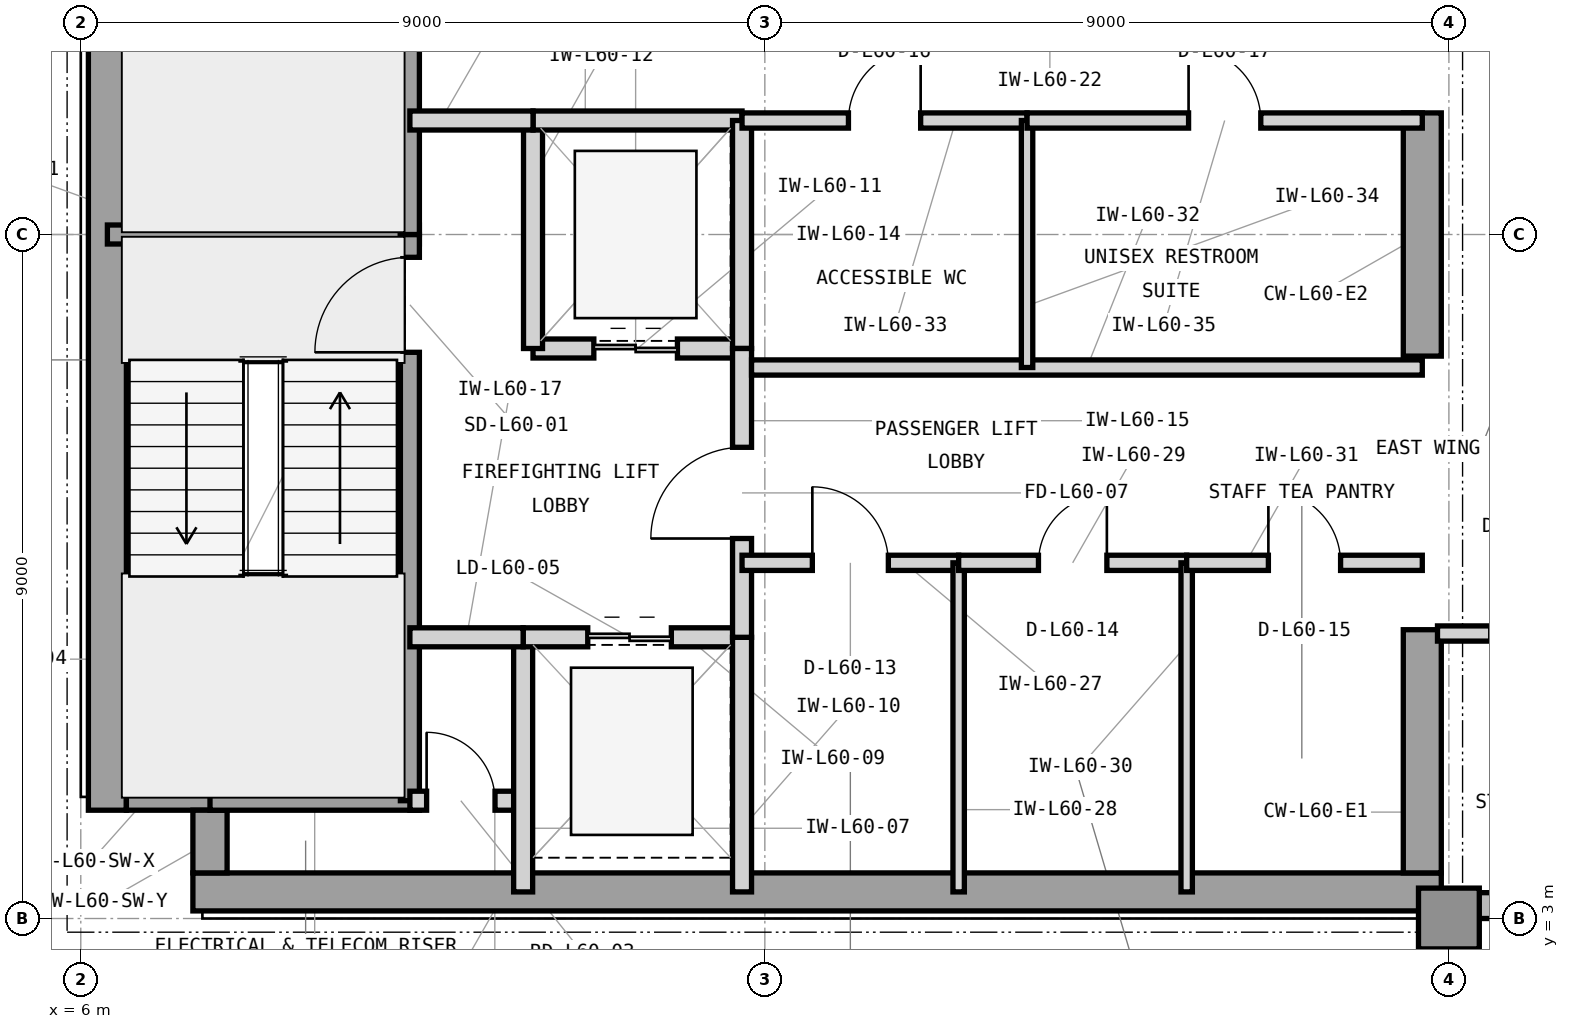
"""IFC4 building model, lengths in metres.
Left out: names, types, materials, properties, quantities, classifications, styles, units other than length and angle.
Written with IfcOpenShell. Run it as: python <this file> out.ifc"""

import sys

from ifc_helpers import new_model, si_unit, direction, frame, frame_2d, origin, origin_2d, place, context, subcontext, project, spatial, rectangle, extrude, element, fill, save


model = new_model("IFC4")
c1 = context("Model", 3, precision=1e-05, world=origin(), true_north=direction((0.0, 1.0)))
c2 = subcontext(c1, "Body", "Model", "MODEL_VIEW")
j1 = project(units=[si_unit("LENGTHUNIT", "METRE"), si_unit("PLANEANGLEUNIT", "RADIAN")], contexts=[c1])
p1 = place(None, origin())
s1 = spatial("IfcSite", under=j1, at=p1, CompositionType="ELEMENT")
p2 = place(p1, origin())
s2 = spatial("IfcBuilding", under=s1, at=p2, CompositionType="ELEMENT")
p3 = place(p2, frame((0.0, 0.0, 246.9)))
s3 = spatial("IfcBuildingStorey", under=s2, at=p3, CompositionType="ELEMENT", Elevation=246.9)
p4 = place(p3, frame((7.475, 3.35, 0.0), z_axis=(0.0, 0.0, 1.0), x_axis=(1.0, 0.0, 0.0)))
e1 = element("IfcWall", 1, at=p4, inside=s3, PredefinedType="SHEAR", context=c2, shape_type="SweptSolid", body=[
    extrude(rectangle(XDim=16.425, YDim=0.5, at=frame_2d((8.212, 0.0))), origin(), (0.0, 0.0, 1.0), 3.9),
])
p5 = place(p3, frame((6.35, 4.425, 0.0), z_axis=(0.0, 0.0, 1.0), x_axis=(0.0, 1.0, 0.0)))
e2 = element("IfcWall", 2, at=p5, inside=s3, PredefinedType="SHEAR", context=c2, shape_type="SweptSolid", body=[
    extrude(rectangle(XDim=15.15, YDim=0.5, at=frame_2d((7.575, 0.0))), origin(), (0.0, 0.0, 1.0), 3.9),
])
p6 = place(p3, frame((23.65, 3.6, 0.0), z_axis=(0.0, 0.0, 1.0), x_axis=(0.0, 1.0, 0.0)))
e3 = element("IfcWall", 3, at=p6, inside=s3, PredefinedType="SHEAR", context=c2, shape_type="SweptSolid", body=[
    extrude(rectangle(XDim=3.2, YDim=0.5, at=frame_2d((1.6, 0.0))), origin(), (0.0, 0.0, 1.0), 3.9),
])
p7 = place(p3, frame((23.65, 10.4, 0.0), z_axis=(0.0, 0.0, 1.0), x_axis=(0.0, 1.0, 0.0)))
e4 = element("IfcWall", 4, at=p7, inside=s3, PredefinedType="SHEAR", context=c2, shape_type="SweptSolid", body=[
    extrude(rectangle(XDim=3.2, YDim=0.5, at=frame_2d((1.6, 0.0))), origin(), (0.0, 0.0, 1.0), 3.9),
])
p8 = place(p3, frame((6.6, 4.65, 0.0), z_axis=(0.0, 0.0, 1.0), x_axis=(1.0, 0.0, 0.0)))
e5 = element("IfcWall", 5, at=p8, inside=s3, PredefinedType="SHEAR", context=c2, shape_type="SweptSolid", body=[
    extrude(rectangle(XDim=1.325, YDim=0.45, at=frame_2d((0.663, 0.0))), origin(), (0.0, 0.0, 1.0), 3.9),
])
p9 = place(p3, frame((7.7, 3.6, 0.0), z_axis=(0.0, 0.0, 1.0), x_axis=(0.0, 1.0, 0.0)))
e6 = element("IfcWall", 6, at=p9, inside=s3, PredefinedType="SHEAR", context=c2, shape_type="SweptSolid", body=[
    extrude(rectangle(XDim=0.825, YDim=0.45, at=frame_2d((0.413, 0.0))), origin(), (0.0, 0.0, 1.0), 3.9),
])
p10 = place(p3, frame((24.0, 3.0, 0.0), z_axis=(0.0, 0.0, 1.0), x_axis=(1.0, 0.0, 0.0)))
e7 = element("IfcColumn", 7, at=p10, inside=s3, PredefinedType="COLUMN", context=c2, shape_type="SweptSolid", body=[
    extrude(rectangle(XDim=0.8, YDim=0.8, at=origin_2d()), origin(), (0.0, 0.0, 1.0), 3.9),
])
p11 = place(p3, frame((23.9, 3.17, 0.0), z_axis=(0.0, 0.0, 1.0), x_axis=(1.0, 0.0, 0.0)))
e8 = element("IfcWall", 8, at=p11, inside=s3, PredefinedType="STANDARD", context=c2, shape_type="SweptSolid", body=[
    extrude(rectangle(XDim=28.5, YDim=0.34, at=frame_2d((14.25, 0.0))), origin(), (0.0, 0.0, 1.0), 3.7),
])
p12 = place(p11, frame((10.725, 0.0, 0.9)))
e9 = element("IfcOpeningElement", 9, at=p12, cuts=e8, PredefinedType="OPENING", context=c2, shape_type="SweptSolid", body=[
    extrude(rectangle(XDim=2.3, YDim=2.2, at=frame_2d((1.15, 1.1))), frame((0.0, 0.18, 0.0), z_axis=(0.0, -1.0, 0.0), x_axis=(1.0, 0.0, 0.0)), (0.0, 0.0, 1.0), 0.36),
])
p13 = place(p11, frame((0.85, 0.0, 0.9)))
e10 = element("IfcOpeningElement", 10, at=p13, cuts=e8, PredefinedType="OPENING", context=c2, shape_type="SweptSolid", body=[
    extrude(rectangle(XDim=1.6, YDim=2.2, at=frame_2d((0.8, 1.1))), frame((0.0, 0.18, 0.0), z_axis=(0.0, -1.0, 0.0), x_axis=(1.0, 0.0, 0.0)), (0.0, 0.0, 1.0), 0.36),
])
p14 = place(p11, frame((19.075, 0.0, 0.9)))
e11 = element("IfcOpeningElement", 11, at=p14, cuts=e8, PredefinedType="OPENING", context=c2, shape_type="SweptSolid", body=[
    extrude(rectangle(XDim=2.3, YDim=2.2, at=frame_2d((1.15, 1.1))), frame((0.0, 0.18, 0.0), z_axis=(0.0, -1.0, 0.0), x_axis=(1.0, 0.0, 0.0)), (0.0, 0.0, 1.0), 0.36),
])
p15 = place(p3, frame((6.35, 12.0, 0.0), z_axis=(0.0, 0.0, 1.0), x_axis=(1.0, 0.0, 0.0)))
e12 = element("IfcWall", 12, at=p15, inside=s3, PredefinedType="SHEAR", context=c2, shape_type="SweptSolid", body=[
    extrude(rectangle(XDim=4.105, YDim=0.25, at=frame_2d((2.052, 0.0))), origin(), (0.0, 0.0, 1.0), 3.9),
])
p16 = place(p3, frame((7.7, 4.55, 0.0), z_axis=(0.0, 0.0, 1.0), x_axis=(1.0, 0.0, 0.0)))
e13 = element("IfcWall", 13, at=p16, inside=s3, PredefinedType="SHEAR", context=c2, shape_type="SweptSolid", body=[
    extrude(rectangle(XDim=2.755, YDim=0.25, at=frame_2d((1.377, 0.0))), origin(), (0.0, 0.0, 1.0), 3.9),
])
p17 = place(p3, frame((10.33, 4.55, 0.0), z_axis=(0.0, 0.0, 1.0), x_axis=(0.0, 1.0, 0.0)))
e14 = element("IfcWall", 14, at=p17, inside=s3, PredefinedType="SHEAR", context=c2, shape_type="SweptSolid", body=[
    extrude(rectangle(XDim=7.45, YDim=0.25, at=frame_2d((3.725, 0.0))), origin(), (0.0, 0.0, 1.0), 3.9),
])
p18 = place(p17, frame((5.9, 0.0, 0.0)))
e15 = element("IfcOpeningElement", 15, at=p18, cuts=e14, PredefinedType="OPENING", context=c2, shape_type="SweptSolid", body=[
    extrude(rectangle(XDim=1.25, YDim=2.2, at=frame_2d((0.625, 1.1))), frame((0.0, 0.135, 0.0), z_axis=(0.0, -1.0, 0.0), x_axis=(1.0, 0.0, 0.0)), (0.0, 0.0, 1.0), 0.27),
])
p19 = place(p3, frame((10.33, 12.0, 0.0), z_axis=(0.0, 0.0, 1.0), x_axis=(0.0, 1.0, 0.0)))
e16 = element("IfcWall", 16, at=p19, inside=s3, PredefinedType="SHEAR", context=c2, shape_type="SweptSolid", body=[
    extrude(rectangle(XDim=7.45, YDim=0.25, at=frame_2d((3.725, 0.0))), origin(), (0.0, 0.0, 1.0), 3.9),
])
p20 = place(p19, frame((5.85, 0.0, 0.0)))
e17 = element("IfcOpeningElement", 17, at=p20, cuts=e16, PredefinedType="OPENING", context=c2, shape_type="SweptSolid", body=[
    extrude(rectangle(XDim=1.25, YDim=2.2, at=frame_2d((0.625, 1.1))), frame((0.0, 0.135, 0.0), z_axis=(0.0, -1.0, 0.0), x_axis=(1.0, 0.0, 0.0)), (0.0, 0.0, 1.0), 0.27),
])
p21 = place(p3, frame((10.33, 4.55, 0.0), z_axis=(0.0, 0.0, 1.0), x_axis=(1.0, 0.0, 0.0)))
e18 = element("IfcWall", 18, at=p21, inside=s3, PredefinedType="PARTITIONING", context=c2, shape_type="SweptSolid", body=[
    extrude(rectangle(XDim=1.49, YDim=0.25, at=frame_2d((0.745, 0.0))), origin(), (0.0, 0.0, 1.0), 3.69),
])
p22 = place(p21, frame((0.22, 0.0, 0.0)))
e19 = element("IfcOpeningElement", 19, at=p22, cuts=e18, PredefinedType="OPENING", context=c2, shape_type="SweptSolid", body=[
    extrude(rectangle(XDim=0.9, YDim=2.1, at=frame_2d((0.45, 1.05))), frame((0.0, 0.135, 0.0), z_axis=(0.0, -1.0, 0.0), x_axis=(1.0, 0.0, 0.0)), (0.0, 0.0, 1.0), 0.27),
])
p23 = place(p3, frame((11.82, 3.35, 0.0), z_axis=(0.0, 0.0, 1.0), x_axis=(0.0, 1.0, 0.0)))
e20 = element("IfcWall", 20, at=p23, inside=s3, PredefinedType="PARTITIONING", context=c2, shape_type="SweptSolid", body=[
    extrude(rectangle(XDim=3.35, YDim=0.25, at=frame_2d((1.675, 0.0))), origin(), (0.0, 0.0, 1.0), 3.69),
])
p24 = place(p3, frame((11.82, 6.7, 0.0), z_axis=(0.0, 0.0, 1.0), x_axis=(1.0, 0.0, 0.0)))
e21 = element("IfcWall", 21, at=p24, inside=s3, PredefinedType="PARTITIONING", context=c2, shape_type="SweptSolid", body=[
    extrude(rectangle(XDim=2.88, YDim=0.25, at=frame_2d((1.44, 0.0))), origin(), (0.0, 0.0, 1.0), 3.073),
])
p25 = place(p24, frame((0.85, 0.0, 0.0)))
e22 = element("IfcOpeningElement", 22, at=p25, cuts=e21, PredefinedType="OPENING", context=c2, shape_type="SweptSolid", body=[
    extrude(rectangle(XDim=1.1, YDim=2.25, at=frame_2d((0.55, 1.125))), frame((0.0, 0.135, 0.0), z_axis=(0.0, -1.0, 0.0), x_axis=(1.0, 0.0, 0.0)), (0.0, 0.0, 1.0), 0.27),
])
p26 = place(p3, frame((14.7, 3.35, 0.0), z_axis=(0.0, 0.0, 1.0), x_axis=(0.0, 1.0, 0.0)))
e23 = element("IfcWall", 23, at=p26, inside=s3, PredefinedType="PARTITIONING", context=c2, shape_type="SweptSolid", body=[
    extrude(rectangle(XDim=3.35, YDim=0.25, at=frame_2d((1.675, 0.0))), origin(), (0.0, 0.0, 1.0), 3.69),
])
p27 = place(p3, frame((11.95, 10.5, 0.0), z_axis=(0.0, 0.0, 1.0), x_axis=(1.0, 0.0, 0.0)))
e24 = element("IfcWall", 24, at=p27, inside=s3, PredefinedType="PARTITIONING", context=c2, shape_type="SweptSolid", body=[
    extrude(rectangle(XDim=2.75, YDim=0.25, at=frame_2d((1.375, 0.0))), origin(), (0.0, 0.0, 1.0), 3.073),
])
p28 = place(p27, frame((0.8, 0.0, 0.0)))
e25 = element("IfcOpeningElement", 25, at=p28, cuts=e24, PredefinedType="OPENING", context=c2, shape_type="SweptSolid", body=[
    extrude(rectangle(XDim=1.1, YDim=2.25, at=frame_2d((0.55, 1.125))), frame((0.0, 0.135, 0.0), z_axis=(0.0, -1.0, 0.0), x_axis=(1.0, 0.0, 0.0)), (0.0, 0.0, 1.0), 0.27),
])
p29 = place(p3, frame((11.95, 10.5, 0.0), z_axis=(0.0, 0.0, 1.0), x_axis=(0.0, 1.0, 0.0)))
e26 = element("IfcWall", 26, at=p29, inside=s3, PredefinedType="PARTITIONING", context=c2, shape_type="SweptSolid", body=[
    extrude(rectangle(XDim=3.0, YDim=0.25, at=frame_2d((1.5, 0.0))), origin(), (0.0, 0.0, 1.0), 3.69),
])
p30 = place(p3, frame((11.95, 13.5, 0.0), z_axis=(0.0, 0.0, 1.0), x_axis=(1.0, 0.0, 0.0)))
e27 = element("IfcWall", 27, at=p30, inside=s3, PredefinedType="PARTITIONING", context=c2, shape_type="SweptSolid", body=[
    extrude(rectangle(XDim=2.75, YDim=0.25, at=frame_2d((1.375, 0.0))), origin(), (0.0, 0.0, 1.0), 3.073),
])
p31 = place(p3, frame((14.7, 10.5, 0.0), z_axis=(0.0, 0.0, 1.0), x_axis=(0.0, 1.0, 0.0)))
e28 = element("IfcWall", 28, at=p31, inside=s3, PredefinedType="PARTITIONING", context=c2, shape_type="SweptSolid", body=[
    extrude(rectangle(XDim=3.0, YDim=0.25, at=frame_2d((1.5, 0.0))), origin(), (0.0, 0.0, 1.0), 3.69),
])
p32 = place(p3, frame((14.7, 6.7, 0.0), z_axis=(0.0, 0.0, 1.0), x_axis=(0.0, 1.0, 0.0)))
e29 = element("IfcWall", 29, at=p32, inside=s3, PredefinedType="PARTITIONING", context=c2, shape_type="SweptSolid", body=[
    extrude(rectangle(XDim=3.8, YDim=0.25, at=frame_2d((1.9, 0.0))), origin(), (0.0, 0.0, 1.0), 3.69),
])
p33 = place(p32, frame((1.3, 0.0, 0.0)))
e30 = element("IfcOpeningElement", 30, at=p33, cuts=e29, PredefinedType="OPENING", context=c2, shape_type="SweptSolid", body=[
    extrude(rectangle(XDim=1.2, YDim=2.2, at=frame_2d((0.6, 1.1))), frame((0.0, 0.135, 0.0), z_axis=(0.0, -1.0, 0.0), x_axis=(1.0, 0.0, 0.0)), (0.0, 0.0, 1.0), 0.27),
])
p34 = place(p3, frame((10.33, 13.5, 0.0), z_axis=(0.0, 0.0, 1.0), x_axis=(1.0, 0.0, 0.0)))
e31 = element("IfcWall", 31, at=p34, inside=s3, PredefinedType="PARTITIONING", context=c2, shape_type="SweptSolid", body=[
    extrude(rectangle(XDim=1.62, YDim=0.25, at=frame_2d((0.81, 0.0))), origin(), (0.0, 0.0, 1.0), 3.073),
])
p35 = place(p3, frame((10.33, 6.7, 0.0), z_axis=(0.0, 0.0, 1.0), x_axis=(1.0, 0.0, 0.0)))
e32 = element("IfcWall", 32, at=p35, inside=s3, PredefinedType="PARTITIONING", context=c2, shape_type="SweptSolid", body=[
    extrude(rectangle(XDim=1.49, YDim=0.25, at=frame_2d((0.745, 0.0))), origin(), (0.0, 0.0, 1.0), 3.073),
])
p36 = place(p3, frame((14.7, 7.68, 0.0), z_axis=(0.0, 0.0, 1.0), x_axis=(1.0, 0.0, 0.0)))
e33 = element("IfcWall", 33, at=p36, inside=s3, PredefinedType="PARTITIONING", context=c2, shape_type="SweptSolid", body=[
    extrude(rectangle(XDim=2.85, YDim=0.2, at=frame_2d((1.425, 0.0))), origin(), (0.0, 0.0, 1.0), 3.69),
])
p37 = place(p36, frame((0.925, 0.0, 0.0)))
e34 = element("IfcOpeningElement", 34, at=p37, cuts=e33, PredefinedType="OPENING", context=c2, shape_type="SweptSolid", body=[
    extrude(rectangle(XDim=1.0, YDim=2.15, at=frame_2d((0.5, 1.075))), frame((0.0, 0.11, 0.0), z_axis=(0.0, -1.0, 0.0), x_axis=(1.0, 0.0, 0.0)), (0.0, 0.0, 1.0), 0.22),
])
p38 = place(p3, frame((17.55, 3.35, 0.0), z_axis=(0.0, 0.0, 1.0), x_axis=(0.0, 1.0, 0.0)))
e35 = element("IfcWall", 35, at=p38, inside=s3, PredefinedType="PARTITIONING", context=c2, shape_type="SweptSolid", body=[
    extrude(rectangle(XDim=4.33, YDim=0.15, at=frame_2d((2.165, 0.0))), origin(), (0.0, 0.0, 1.0), 3.69),
])
p39 = place(p3, frame((17.55, 7.68, 0.0), z_axis=(0.0, 0.0, 1.0), x_axis=(1.0, 0.0, 0.0)))
e36 = element("IfcWall", 36, at=p39, inside=s3, PredefinedType="PARTITIONING", context=c2, shape_type="SweptSolid", body=[
    extrude(rectangle(XDim=3.0, YDim=0.2, at=frame_2d((1.5, 0.0))), origin(), (0.0, 0.0, 1.0), 3.69),
])
p40 = place(p39, frame((1.05, 0.0, 0.0)))
e37 = element("IfcOpeningElement", 37, at=p40, cuts=e36, PredefinedType="OPENING", context=c2, shape_type="SweptSolid", body=[
    extrude(rectangle(XDim=0.9, YDim=2.1, at=frame_2d((0.45, 1.05))), frame((0.0, 0.11, 0.0), z_axis=(0.0, -1.0, 0.0), x_axis=(1.0, 0.0, 0.0)), (0.0, 0.0, 1.0), 0.22),
])
p41 = place(p3, frame((20.55, 3.35, 0.0), z_axis=(0.0, 0.0, 1.0), x_axis=(0.0, 1.0, 0.0)))
e38 = element("IfcWall", 38, at=p41, inside=s3, PredefinedType="PARTITIONING", context=c2, shape_type="SweptSolid", body=[
    extrude(rectangle(XDim=4.33, YDim=0.15, at=frame_2d((2.165, 0.0))), origin(), (0.0, 0.0, 1.0), 3.69),
])
p42 = place(p3, frame((20.55, 7.68, 0.0), z_axis=(0.0, 0.0, 1.0), x_axis=(1.0, 0.0, 0.0)))
e39 = element("IfcWall", 39, at=p42, inside=s3, PredefinedType="PARTITIONING", context=c2, shape_type="SweptSolid", body=[
    extrude(rectangle(XDim=3.1, YDim=0.2, at=frame_2d((1.55, 0.0))), origin(), (0.0, 0.0, 1.0), 3.69),
])
p43 = place(p42, frame((1.075, 0.0, 0.0)))
e40 = element("IfcOpeningElement", 40, at=p43, cuts=e39, PredefinedType="OPENING", context=c2, shape_type="SweptSolid", body=[
    extrude(rectangle(XDim=0.95, YDim=2.1, at=frame_2d((0.475, 1.05))), frame((0.0, 0.11, 0.0), z_axis=(0.0, -1.0, 0.0), x_axis=(1.0, 0.0, 0.0)), (0.0, 0.0, 1.0), 0.22),
])
p44 = place(p3, frame((14.825, 10.25, 0.0), z_axis=(0.0, 0.0, 1.0), x_axis=(1.0, 0.0, 0.0)))
e41 = element("IfcWall", 41, at=p44, inside=s3, PredefinedType="PARTITIONING", context=c2, shape_type="SweptSolid", body=[
    extrude(rectangle(XDim=8.825, YDim=0.2, at=frame_2d((4.413, 0.0))), origin(), (0.0, 0.0, 1.0), 3.69),
])
p45 = place(p3, frame((14.7, 13.5, 0.0), z_axis=(0.0, 0.0, 1.0), x_axis=(1.0, 0.0, 0.0)))
e42 = element("IfcWall", 42, at=p45, inside=s3, PredefinedType="PARTITIONING", context=c2, shape_type="SweptSolid", body=[
    extrude(rectangle(XDim=3.75, YDim=0.2, at=frame_2d((1.875, 0.0))), origin(), (0.0, 0.0, 1.0), 3.073),
])
p46 = place(p45, frame((1.4, 0.0, 0.0)))
e43 = element("IfcOpeningElement", 43, at=p46, cuts=e42, PredefinedType="OPENING", context=c2, shape_type="SweptSolid", body=[
    extrude(rectangle(XDim=0.95, YDim=2.1, at=frame_2d((0.475, 1.05))), frame((0.0, 0.11, 0.0), z_axis=(0.0, -1.0, 0.0), x_axis=(1.0, 0.0, 0.0)), (0.0, 0.0, 1.0), 0.22),
])
p47 = place(p3, frame((18.45, 10.25, 0.0), z_axis=(0.0, 0.0, 1.0), x_axis=(0.0, 1.0, 0.0)))
e44 = element("IfcWall", 44, at=p47, inside=s3, PredefinedType="PARTITIONING", context=c2, shape_type="SweptSolid", body=[
    extrude(rectangle(XDim=3.25, YDim=0.15, at=frame_2d((1.625, 0.0))), origin(), (0.0, 0.0, 1.0), 3.69),
])
p48 = place(p3, frame((18.45, 13.5, 0.0), z_axis=(0.0, 0.0, 1.0), x_axis=(1.0, 0.0, 0.0)))
e45 = element("IfcWall", 45, at=p48, inside=s3, PredefinedType="PARTITIONING", context=c2, shape_type="SweptSolid", body=[
    extrude(rectangle(XDim=5.2, YDim=0.2, at=frame_2d((2.6, 0.0))), origin(), (0.0, 0.0, 1.0), 3.073),
])
p49 = place(p48, frame((2.125, 0.0, 0.0)))
e46 = element("IfcOpeningElement", 46, at=p49, cuts=e45, PredefinedType="OPENING", context=c2, shape_type="SweptSolid", body=[
    extrude(rectangle(XDim=0.95, YDim=2.1, at=frame_2d((0.475, 1.05))), frame((0.0, 0.11, 0.0), z_axis=(0.0, -1.0, 0.0), x_axis=(1.0, 0.0, 0.0)), (0.0, 0.0, 1.0), 0.22),
])
p50 = place(p3, frame((23.85, 6.75, 0.0), z_axis=(0.0, 0.0, 1.0), x_axis=(1.0, 0.0, 0.0)))
e47 = element("IfcWall", 47, at=p50, inside=s3, PredefinedType="PARTITIONING", context=c2, shape_type="SweptSolid", body=[
    extrude(rectangle(XDim=2.85, YDim=0.2, at=frame_2d((1.425, 0.0))), origin(), (0.0, 0.0, 1.0), 3.69),
])
p51 = place(p50, frame((0.7, 0.0, 0.0)))
e48 = element("IfcOpeningElement", 48, at=p51, cuts=e47, PredefinedType="OPENING", context=c2, shape_type="SweptSolid", body=[
    extrude(rectangle(XDim=1.0, YDim=2.15, at=frame_2d((0.5, 1.075))), frame((0.0, 0.11, 0.0), z_axis=(0.0, -1.0, 0.0), x_axis=(1.0, 0.0, 0.0)), (0.0, 0.0, 1.0), 0.22),
])
p52 = place(p18, origin())
e49 = element("IfcDoor", 49, at=p52, inside=s3, OperationType="SINGLE_SWING_LEFT", PredefinedType="DOOR", context=c2, shape_type="SweptSolid", body=[
    extrude(rectangle(XDim=1.25, YDim=2.2, at=frame_2d((0.625, 1.1))), frame((0.0, 0.025, 0.0), z_axis=(0.0, -1.0, 0.0), x_axis=(1.0, 0.0, 0.0)), (0.0, 0.0, 1.0), 0.05),
])
fill(e15, e49)
p53 = place(p22, origin())
e50 = element("IfcDoor", 50, at=p53, inside=s3, OperationType="SINGLE_SWING_LEFT", PredefinedType="TRAPDOOR", context=c2, shape_type="SweptSolid", body=[
    extrude(rectangle(XDim=0.9, YDim=2.1, at=frame_2d((0.45, 1.05))), frame((0.0, 0.025, 0.0), z_axis=(0.0, -1.0, 0.0), x_axis=(1.0, 0.0, 0.0)), (0.0, 0.0, 1.0), 0.05),
])
fill(e19, e50)
p54 = place(p25, origin())
e51 = element("IfcDoor", 51, at=p54, inside=s3, OperationType="DOUBLE_DOOR_SLIDING", PredefinedType="DOOR", context=c2, shape_type="SweptSolid", body=[
    extrude(rectangle(XDim=1.1, YDim=2.25, at=frame_2d((0.55, 1.125))), frame((0.0, 0.025, 0.0), z_axis=(0.0, -1.0, 0.0), x_axis=(1.0, 0.0, 0.0)), (0.0, 0.0, 1.0), 0.05),
])
fill(e22, e51)
p55 = place(p28, origin())
e52 = element("IfcDoor", 52, at=p55, inside=s3, OperationType="DOUBLE_DOOR_SLIDING", PredefinedType="DOOR", context=c2, shape_type="SweptSolid", body=[
    extrude(rectangle(XDim=1.1, YDim=2.25, at=frame_2d((0.55, 1.125))), frame((0.0, 0.025, 0.0), z_axis=(0.0, -1.0, 0.0), x_axis=(1.0, 0.0, 0.0)), (0.0, 0.0, 1.0), 0.05),
])
fill(e25, e52)
p56 = place(p33, origin())
e53 = element("IfcDoor", 53, at=p56, inside=s3, OperationType="SINGLE_SWING_LEFT", PredefinedType="DOOR", context=c2, shape_type="SweptSolid", body=[
    extrude(rectangle(XDim=1.2, YDim=2.2, at=frame_2d((0.6, 1.1))), frame((0.0, 0.025, 0.0), z_axis=(0.0, -1.0, 0.0), x_axis=(1.0, 0.0, 0.0)), (0.0, 0.0, 1.0), 0.05),
])
fill(e30, e53)
p57 = place(p37, origin())
e54 = element("IfcDoor", 54, at=p57, inside=s3, OperationType="SINGLE_SWING_LEFT", PredefinedType="DOOR", context=c2, shape_type="SweptSolid", body=[
    extrude(rectangle(XDim=1.0, YDim=2.15, at=frame_2d((0.5, 1.075))), frame((0.0, 0.025, 0.0), z_axis=(0.0, -1.0, 0.0), x_axis=(1.0, 0.0, 0.0)), (0.0, 0.0, 1.0), 0.05),
])
fill(e34, e54)
p58 = place(p40, origin())
e55 = element("IfcDoor", 55, at=p58, inside=s3, OperationType="SINGLE_SWING_RIGHT", PredefinedType="TRAPDOOR", context=c2, shape_type="SweptSolid", body=[
    extrude(rectangle(XDim=0.9, YDim=2.1, at=frame_2d((0.45, 1.05))), frame((0.0, 0.025, 0.0), z_axis=(0.0, -1.0, 0.0), x_axis=(1.0, 0.0, 0.0)), (0.0, 0.0, 1.0), 0.05),
])
fill(e37, e55)
p59 = place(p43, origin())
e56 = element("IfcDoor", 56, at=p59, inside=s3, OperationType="SINGLE_SWING_LEFT", PredefinedType="DOOR", context=c2, shape_type="SweptSolid", body=[
    extrude(rectangle(XDim=0.95, YDim=2.1, at=frame_2d((0.475, 1.05))), frame((0.0, 0.025, 0.0), z_axis=(0.0, -1.0, 0.0), x_axis=(1.0, 0.0, 0.0)), (0.0, 0.0, 1.0), 0.05),
])
fill(e40, e56)
p60 = place(p46, origin())
e57 = element("IfcDoor", 57, at=p60, inside=s3, OperationType="SINGLE_SWING_RIGHT", PredefinedType="DOOR", context=c2, shape_type="SweptSolid", body=[
    extrude(rectangle(XDim=0.95, YDim=2.1, at=frame_2d((0.475, 1.05))), frame((0.0, 0.025, 0.0), z_axis=(0.0, -1.0, 0.0), x_axis=(1.0, 0.0, 0.0)), (0.0, 0.0, 1.0), 0.05),
])
fill(e43, e57)
p61 = place(p49, origin())
e58 = element("IfcDoor", 58, at=p61, inside=s3, OperationType="SINGLE_SWING_LEFT", PredefinedType="DOOR", context=c2, shape_type="SweptSolid", body=[
    extrude(rectangle(XDim=0.95, YDim=2.1, at=frame_2d((0.475, 1.05))), frame((0.0, 0.025, 0.0), z_axis=(0.0, -1.0, 0.0), x_axis=(1.0, 0.0, 0.0)), (0.0, 0.0, 1.0), 0.05),
])
fill(e46, e58)
save(model, sys.argv[1])
